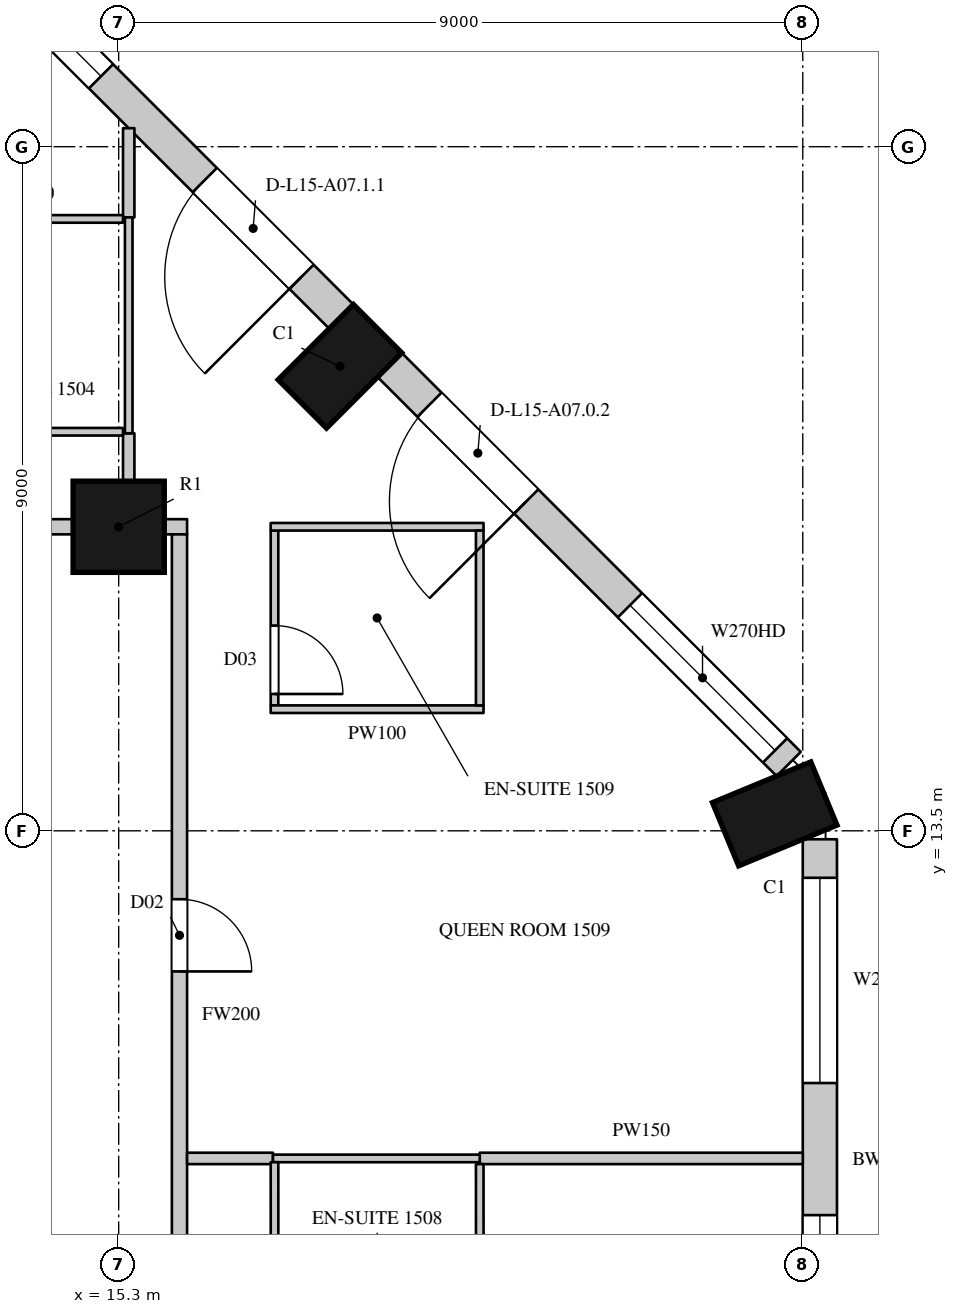
"""IFC4 building model, lengths in metres.
Left out: names, types, materials, properties, quantities, classifications, styles, units other than length and angle.
Written with IfcOpenShell. Run it as: python <this file> out.ifc"""

import sys

from ifc_helpers import new_model, si_unit, direction, frame, frame_2d, origin, origin_2d, place, context, subcontext, project, spatial, rectangle, circle, extrude, element, fill, save


model = new_model("IFC4")
c1 = context("Model", 3, precision=1e-05, world=origin(), true_north=direction((0.0, 1.0)))
c2 = subcontext(c1, "Body", "Model", "MODEL_VIEW")
j1 = project(units=[si_unit("LENGTHUNIT", "METRE"), si_unit("PLANEANGLEUNIT", "RADIAN")], contexts=[c1])
p1 = place(None, origin())
s1 = spatial("IfcSite", under=j1, at=p1, CompositionType="ELEMENT")
p2 = place(p1, origin())
s2 = spatial("IfcBuilding", under=s1, at=p2, CompositionType="ELEMENT")
p3 = place(p2, frame((0.0, 0.0, 84.3)))
s3 = spatial("IfcBuildingStorey", under=s2, at=p3, CompositionType="ELEMENT", Elevation=84.3)
for number, where, z_axis, x_axis in (
    (1, (23.931, 13.723, 0.0), (0.0, 0.0, 1.0), (-0.383, 0.924, 0.0)),
    (2, (18.211, 19.611, 0.0), (0.0, 0.0, 1.0), (-0.707, 0.707, 0.0)),
):
    element("IfcColumn", number, at=place(p3, frame(where, z_axis=z_axis, x_axis=x_axis)), inside=s3, PredefinedType="COLUMN", context=c2, shape_type="SweptSolid", body=[
        extrude(rectangle(XDim=0.9, YDim=1.4, at=origin_2d()), origin(), (0.0, 0.0, 1.0), 3.6),
    ])
p4 = place(p3, frame((15.3, 17.5, 0.0), z_axis=(0.0, 0.0, 1.0), x_axis=(1.0, 0.0, 0.0)))
e3 = element("IfcColumn", 3, at=p4, inside=s3, PredefinedType="COLUMN", context=c2, shape_type="SweptSolid", body=[
    extrude(circle(Radius=0.6, at=origin_2d()), origin(), (0.0, 0.0, 1.0), 3.6),
])
p5 = place(p3, frame((24.525, 4.95, 0.0), z_axis=(0.0, 0.0, 1.0), x_axis=(0.0, 1.0, 0.0)))
e4 = element("IfcWall", 4, at=p5, inside=s3, PredefinedType="SOLIDWALL", context=c2, shape_type="SweptSolid", body=[
    extrude(rectangle(XDim=8.439, YDim=0.45, at=frame_2d((4.219, 0.0))), origin(), (0.0, 0.0, 1.0), 3.3),
])
p6 = place(p5, frame((0.294, 0.0, 0.0)))
e5 = element("IfcOpeningElement", 5, at=p6, cuts=e4, PredefinedType="OPENING", context=c2, shape_type="SweptSolid", body=[
    extrude(rectangle(XDim=1.8, YDim=2.4, at=frame_2d((0.9, 1.2))), frame((0.0, 0.235, 0.0), z_axis=(0.0, -1.0, 0.0), x_axis=(1.0, 0.0, 0.0)), (0.0, 0.0, 1.0), 0.47),
])
p7 = place(p5, frame((2.294, 0.0, 1.05)))
e6 = element("IfcOpeningElement", 6, at=p7, cuts=e4, PredefinedType="OPENING", context=c2, shape_type="SweptSolid", body=[
    extrude(rectangle(XDim=1.2, YDim=2.0, at=frame_2d((0.6, 1.0))), frame((0.0, 0.235, 0.0), z_axis=(0.0, -1.0, 0.0), x_axis=(1.0, 0.0, 0.0)), (0.0, 0.0, 1.0), 0.47),
])
p8 = place(p5, frame((5.232, 0.0, 1.05)))
e7 = element("IfcOpeningElement", 7, at=p8, cuts=e4, PredefinedType="OPENING", context=c2, shape_type="SweptSolid", body=[
    extrude(rectangle(XDim=2.7, YDim=2.0, at=frame_2d((1.35, 1.0))), frame((0.0, 0.235, 0.0), z_axis=(0.0, -1.0, 0.0), x_axis=(1.0, 0.0, 0.0)), (0.0, 0.0, 1.0), 0.47),
])
p9 = place(p3, frame((24.115, 14.379, 0.0), z_axis=(0.0, 0.0, 1.0), x_axis=(-0.707106781187, 0.707106781187, 0.0)))
e8 = element("IfcWall", 8, at=p9, inside=s3, PredefinedType="SOLIDWALL", context=c2, shape_type="SweptSolid", body=[
    extrude(rectangle(XDim=7.424, YDim=0.45, at=frame_2d((3.712, 0.0))), origin(), (0.0, 0.0, 1.0), 3.3),
])
p10 = place(p9, frame((0.253, 0.0, 1.05)))
e9 = element("IfcOpeningElement", 9, at=p10, cuts=e8, PredefinedType="OPENING", context=c2, shape_type="SweptSolid", body=[
    extrude(rectangle(XDim=2.7, YDim=2.0, at=frame_2d((1.35, 1.0))), frame((0.0, 0.235, 0.0), z_axis=(0.0, -1.0, 0.0), x_axis=(1.0, 0.0, 0.0)), (0.0, 0.0, 1.0), 0.47),
])
p11 = place(p9, frame((4.884, 0.0, 0.0)))
e10 = element("IfcOpeningElement", 10, at=p11, cuts=e8, PredefinedType="OPENING", context=c2, shape_type="SweptSolid", body=[
    extrude(rectangle(XDim=1.8, YDim=2.4, at=frame_2d((0.9, 1.2))), frame((0.0, 0.235, 0.0), z_axis=(0.0, -1.0, 0.0), x_axis=(1.0, 0.0, 0.0)), (0.0, 0.0, 1.0), 0.47),
])
p12 = place(p3, frame((18.229, 20.265, 0.0), z_axis=(0.0, 0.0, 1.0), x_axis=(-0.707106781187, 0.707106781187, 0.0)))
e11 = element("IfcWall", 11, at=p12, inside=s3, PredefinedType="SOLIDWALL", context=c2, shape_type="SweptSolid", body=[
    extrude(rectangle(XDim=7.424, YDim=0.45, at=frame_2d((3.712, 0.0))), origin(), (0.0, 0.0, 1.0), 3.3),
])
p13 = place(p12, frame((0.74, 0.0, 0.0)))
e12 = element("IfcOpeningElement", 12, at=p13, cuts=e11, PredefinedType="OPENING", context=c2, shape_type="SweptSolid", body=[
    extrude(rectangle(XDim=1.8, YDim=2.4, at=frame_2d((0.9, 1.2))), frame((0.0, 0.235, 0.0), z_axis=(0.0, -1.0, 0.0), x_axis=(1.0, 0.0, 0.0)), (0.0, 0.0, 1.0), 0.47),
])
p14 = place(p12, frame((4.471, 0.0, 1.05)))
e13 = element("IfcOpeningElement", 13, at=p14, cuts=e11, PredefinedType="OPENING", context=c2, shape_type="SweptSolid", body=[
    extrude(rectangle(XDim=2.7, YDim=2.0, at=frame_2d((1.35, 1.0))), frame((0.0, 0.235, 0.0), z_axis=(0.0, -1.0, 0.0), x_axis=(1.0, 0.0, 0.0)), (0.0, 0.0, 1.0), 0.47),
])
p15 = place(p3, frame((23.15, 16.864, 0.0), z_axis=(0.0, 0.0, 1.0), x_axis=(-0.707106781187, 0.707106781187, 0.0)))
e14 = element("IfcWall", 14, at=p15, inside=s3, PredefinedType="SOLIDWALL", context=c2, shape_type="SweptSolid", body=[
    extrude(rectangle(XDim=1.445, YDim=0.45, at=frame_2d((0.722, 0.0))), origin(), (0.0, 0.0, 1.0), 0.6),
])
p16 = place(p3, frame((19.937, 20.078, 0.0), z_axis=(0.0, 0.0, 1.0), x_axis=(-0.707106781187, 0.707106781187, 0.0)))
e15 = element("IfcWall", 15, at=p16, inside=s3, PredefinedType="SOLIDWALL", context=c2, shape_type="SweptSolid", body=[
    extrude(rectangle(XDim=1.781, YDim=0.45, at=frame_2d((0.89, 0.0))), origin(), (0.0, 0.0, 1.0), 0.6),
])
p17 = place(p3, frame((16.486, 23.529, 0.0), z_axis=(0.0, 0.0, 1.0), x_axis=(-0.707022305137, 0.707191247145, 0.0)))
e16 = element("IfcWall", 16, at=p17, inside=s3, PredefinedType="SOLIDWALL", context=c2, shape_type="SweptSolid", body=[
    extrude(rectangle(XDim=1.445, YDim=0.45, at=frame_2d((0.723, 0.0))), origin(), (0.0, 0.0, 1.0), 0.6),
])
p18 = place(p3, frame((6.9, 17.5, 0.0), z_axis=(0.0, 0.0, 1.0), x_axis=(1.0, 0.0, 0.0)))
e17 = element("IfcWall", 17, at=p18, inside=s3, PredefinedType="PARTITIONING", context=c2, shape_type="SweptSolid", body=[
    extrude(rectangle(XDim=7.8, YDim=0.2, at=frame_2d((3.9, 0.0))), origin(), (0.0, 0.0, 1.0), 2.75),
])
p19 = place(p18, frame((1.45, 0.0, 0.0)))
e18 = element("IfcOpeningElement", 18, at=p19, cuts=e17, PredefinedType="OPENING", context=c2, shape_type="SweptSolid", body=[
    extrude(rectangle(XDim=1.1, YDim=2.4, at=frame_2d((0.55, 1.2))), frame((0.0, 0.11, 0.0), z_axis=(0.0, -1.0, 0.0), x_axis=(1.0, 0.0, 0.0)), (0.0, 0.0, 1.0), 0.22),
])
p20 = place(p3, frame((15.9, 17.5, 0.0), z_axis=(0.0, 0.0, 1.0), x_axis=(1.0, 0.0, 0.0)))
e19 = element("IfcWall", 19, at=p20, inside=s3, PredefinedType="PARTITIONING", context=c2, shape_type="SweptSolid", body=[
    extrude(rectangle(XDim=0.3, YDim=0.2, at=frame_2d((0.15, 0.0))), origin(), (0.0, 0.0, 1.0), 3.3),
])
p21 = place(p3, frame((16.1, 4.75, 0.0), z_axis=(0.0, 0.0, 1.0), x_axis=(0.0, 1.0, 0.0)))
e20 = element("IfcWall", 20, at=p21, inside=s3, PredefinedType="PARTITIONING", context=c2, shape_type="SweptSolid", body=[
    extrude(rectangle(XDim=12.65, YDim=0.2, at=frame_2d((6.325, 0.0))), origin(), (0.0, 0.0, 1.0), 3.3),
])
p22 = place(p21, frame((0.5, 0.0, 0.0)))
e21 = element("IfcOpeningElement", 21, at=p22, cuts=e20, PredefinedType="OPENING", context=c2, shape_type="SweptSolid", body=[
    extrude(rectangle(XDim=0.95, YDim=2.2, at=frame_2d((0.475, 1.1))), frame((0.0, 0.11, 0.0), z_axis=(0.0, -1.0, 0.0), x_axis=(1.0, 0.0, 0.0)), (0.0, 0.0, 1.0), 0.22),
])
p23 = place(p21, frame((6.9, 0.0, 0.0)))
e22 = element("IfcOpeningElement", 22, at=p23, cuts=e20, PredefinedType="OPENING", context=c2, shape_type="SweptSolid", body=[
    extrude(rectangle(XDim=0.95, YDim=2.2, at=frame_2d((0.475, 1.1))), frame((0.0, 0.11, 0.0), z_axis=(0.0, -1.0, 0.0), x_axis=(1.0, 0.0, 0.0)), (0.0, 0.0, 1.0), 0.22),
])
p24 = place(p3, frame((15.432, 18.094, 0.0), z_axis=(0.0, 0.0, 1.0), x_axis=(0.0, 1.0, 0.0)))
e23 = element("IfcWall", 23, at=p24, inside=s3, PredefinedType="PARTITIONING", context=c2, shape_type="SweptSolid", body=[
    extrude(rectangle(XDim=0.636, YDim=0.15, at=frame_2d((0.318, 0.0))), origin(), (0.0, 0.0, 1.0), 3.3),
])
p25 = place(p3, frame((15.432, 21.57, 0.0), z_axis=(0.0, 0.0, 1.0), x_axis=(0.0, 1.0, 0.0)))
e24 = element("IfcWall", 24, at=p25, inside=s3, PredefinedType="PARTITIONING", context=c2, shape_type="SweptSolid", body=[
    extrude(rectangle(XDim=1.174, YDim=0.15, at=frame_2d((0.587, 0.0))), origin(), (0.0, 0.0, 1.0), 3.3),
])
p26 = place(p3, frame((16.2, 9.19, 0.0), z_axis=(0.0, 0.0, 1.0), x_axis=(1.0, 0.0, 0.0)))
e25 = element("IfcWall", 25, at=p26, inside=s3, PredefinedType="PARTITIONING", context=c2, shape_type="SweptSolid", body=[
    extrude(rectangle(XDim=1.13, YDim=0.15, at=frame_2d((0.565, 0.0))), origin(), (0.0, 0.0, 1.0), 2.65),
])
p27 = place(p3, frame((20.05, 9.19, 0.0), z_axis=(0.0, 0.0, 1.0), x_axis=(1.0, 0.0, 0.0)))
e26 = element("IfcWall", 26, at=p27, inside=s3, PredefinedType="PARTITIONING", context=c2, shape_type="SweptSolid", body=[
    extrude(rectangle(XDim=4.25, YDim=0.15, at=frame_2d((2.125, 0.0))), origin(), (0.0, 0.0, 1.0), 2.65),
])
for number, where, z_axis, x_axis in (
    (27, (12.786, 18.75, 0.0), (0.0, 0.0, 1.0), (1.0, 0.0, 0.0)),
    (28, (12.786, 21.55, 0.0), (0.0, 0.0, 1.0), (1.0, 0.0, 0.0)),
):
    element("IfcWall", number, at=place(p3, frame(where, z_axis=z_axis, x_axis=x_axis)), inside=s3, PredefinedType="PARTITIONING", context=c2, shape_type="SweptSolid", body=[
        extrude(rectangle(XDim=2.571, YDim=0.1, at=frame_2d((1.286, 0.0))), origin(), (0.0, 0.0, 1.0), 3.3),
    ])
p28 = place(p3, frame((15.432, 18.73, 0.0), z_axis=(0.0, 0.0, 1.0), x_axis=(0.0, 1.0, 0.0)))
e29 = element("IfcWall", 29, at=p28, inside=s3, PredefinedType="PARTITIONING", context=c2, shape_type="SweptSolid", body=[
    extrude(rectangle(XDim=2.84, YDim=0.1, at=frame_2d((1.42, 0.0))), origin(), (0.0, 0.0, 1.0), 3.3),
])
p29 = place(p3, frame((17.33, 9.19, 0.0), z_axis=(0.0, 0.0, 1.0), x_axis=(1.0, 0.0, 0.0)))
e30 = element("IfcWall", 30, at=p29, inside=s3, PredefinedType="PARTITIONING", context=c2, shape_type="SweptSolid", body=[
    extrude(rectangle(XDim=2.72, YDim=0.1, at=frame_2d((1.36, 0.0))), origin(), (0.0, 0.0, 1.0), 2.65),
])
p30 = place(p3, frame((17.35, 9.14, 0.0), z_axis=(0.0, 0.0, 1.0), x_axis=(0.000407580973, -0.999999916939, 0.0)))
e31 = element("IfcWall", 31, at=p30, inside=s3, PredefinedType="PARTITIONING", context=c2, shape_type="SweptSolid", body=[
    extrude(rectangle(XDim=2.396, YDim=0.1, at=frame_2d((1.198, 0.0))), origin(), (0.0, 0.0, 1.0), 3.3),
])
p31 = place(p30, frame((1.25, 0.0, 0.0)))
e32 = element("IfcOpeningElement", 32, at=p31, cuts=e31, PredefinedType="OPENING", context=c2, shape_type="SweptSolid", body=[
    extrude(rectangle(XDim=0.9, YDim=2.2, at=frame_2d((0.45, 1.1))), frame((0.0, 0.06, 0.0), z_axis=(0.0, -1.0, 0.0), x_axis=(1.0, 0.0, 0.0)), (0.0, 0.0, 1.0), 0.12),
])
p32 = place(p3, frame((17.35, 15.15, 0.0), z_axis=(0.0, 0.0, 1.0), x_axis=(0.0, 1.0, 0.0)))
e33 = element("IfcWall", 33, at=p32, inside=s3, PredefinedType="PARTITIONING", context=c2, shape_type="SweptSolid", body=[
    extrude(rectangle(XDim=2.3, YDim=0.1, at=frame_2d((1.15, 0.0))), origin(), (0.0, 0.0, 1.0), 3.3),
])
p33 = place(p32, frame((0.15, 0.0, 0.0)))
e34 = element("IfcOpeningElement", 34, at=p33, cuts=e33, PredefinedType="OPENING", context=c2, shape_type="SweptSolid", body=[
    extrude(rectangle(XDim=0.9, YDim=2.2, at=frame_2d((0.45, 1.1))), frame((0.0, 0.06, 0.0), z_axis=(0.0, -1.0, 0.0), x_axis=(1.0, 0.0, 0.0)), (0.0, 0.0, 1.0), 0.12),
])
for number, where, z_axis, x_axis in (
    (35, (17.3, 15.1, 0.0), (0.0, 0.0, 1.0), (1.0, 0.0, 0.0)),
    (36, (17.3, 17.5, 0.0), (0.0, 0.0, 1.0), (1.0, 0.0, 0.0)),
):
    element("IfcWall", number, at=place(p3, frame(where, z_axis=z_axis, x_axis=x_axis)), inside=s3, PredefinedType="PARTITIONING", context=c2, shape_type="SweptSolid", body=[
        extrude(rectangle(XDim=2.8, YDim=0.1, at=frame_2d((1.4, 0.0))), origin(), (0.0, 0.0, 1.0), 3.3),
    ])
p34 = place(p3, frame((20.05, 9.115, 0.0), z_axis=(0.0, 0.0, 1.0), x_axis=(0.000430200003, -0.999999907464, 0.0)))
e37 = element("IfcWall", 37, at=p34, inside=s3, PredefinedType="PARTITIONING", context=c2, shape_type="SweptSolid", body=[
    extrude(rectangle(XDim=2.27, YDim=0.1, at=frame_2d((1.135, 0.0))), origin(), (0.0, 0.0, 1.0), 3.3),
])
p35 = place(p3, frame((20.05, 15.15, 0.0), z_axis=(0.0, 0.0, 1.0), x_axis=(0.0, 1.0, 0.0)))
e38 = element("IfcWall", 38, at=p35, inside=s3, PredefinedType="PARTITIONING", context=c2, shape_type="SweptSolid", body=[
    extrude(rectangle(XDim=2.3, YDim=0.1, at=frame_2d((1.15, 0.0))), origin(), (0.0, 0.0, 1.0), 3.3),
])
p36 = place(p7, origin())
e39 = element("IfcWindow", 39, at=p36, inside=s3, PartitioningType="SINGLE_PANEL", PredefinedType="WINDOW", context=c2, shape_type="SweptSolid", body=[
    extrude(rectangle(XDim=1.2, YDim=2.0, at=frame_2d((0.6, 1.0))), frame((0.0, 0.135, 0.0), z_axis=(0.0, -1.0, 0.0), x_axis=(1.0, 0.0, 0.0)), (0.0, 0.0, 1.0), 0.06),
])
fill(e6, e39)
p37 = place(p8, origin())
e40 = element("IfcWindow", 40, at=p37, inside=s3, PartitioningType="SINGLE_PANEL", PredefinedType="WINDOW", context=c2, shape_type="SweptSolid", body=[
    extrude(rectangle(XDim=2.7, YDim=2.0, at=frame_2d((1.35, 1.0))), frame((0.0, 0.135, 0.0), z_axis=(0.0, -1.0, 0.0), x_axis=(1.0, 0.0, 0.0)), (0.0, 0.0, 1.0), 0.06),
])
fill(e7, e40)
p38 = place(p10, origin())
e41 = element("IfcWindow", 41, at=p38, inside=s3, PartitioningType="SINGLE_PANEL", PredefinedType="WINDOW", context=c2, shape_type="SweptSolid", body=[
    extrude(rectangle(XDim=2.7, YDim=2.0, at=frame_2d((1.35, 1.0))), frame((0.0, 0.135, 0.0), z_axis=(0.0, -1.0, 0.0), x_axis=(1.0, 0.0, 0.0)), (0.0, 0.0, 1.0), 0.06),
])
fill(e9, e41)
p39 = place(p11, origin())
e42 = element("IfcDoor", 42, at=p39, inside=s3, OperationType="SLIDING_TO_LEFT", PredefinedType="DOOR", context=c2, shape_type="SweptSolid", body=[
    extrude(rectangle(XDim=1.8, YDim=2.4, at=frame_2d((0.9, 1.2))), frame((0.0, 0.13, 0.0), z_axis=(0.0, -1.0, 0.0), x_axis=(1.0, 0.0, 0.0)), (0.0, 0.0, 1.0), 0.05),
])
fill(e10, e42)
p40 = place(p13, origin())
e43 = element("IfcDoor", 43, at=p40, inside=s3, OperationType="SLIDING_TO_LEFT", PredefinedType="DOOR", context=c2, shape_type="SweptSolid", body=[
    extrude(rectangle(XDim=1.8, YDim=2.4, at=frame_2d((0.9, 1.2))), frame((0.0, 0.13, 0.0), z_axis=(0.0, -1.0, 0.0), x_axis=(1.0, 0.0, 0.0)), (0.0, 0.0, 1.0), 0.05),
])
fill(e12, e43)
p41 = place(p14, origin())
e44 = element("IfcWindow", 44, at=p41, inside=s3, PartitioningType="SINGLE_PANEL", PredefinedType="WINDOW", context=c2, shape_type="SweptSolid", body=[
    extrude(rectangle(XDim=2.7, YDim=2.0, at=frame_2d((1.35, 1.0))), frame((0.0, 0.135, 0.0), z_axis=(0.0, -1.0, 0.0), x_axis=(1.0, 0.0, 0.0)), (0.0, 0.0, 1.0), 0.06),
])
fill(e13, e44)
p42 = place(p23, origin())
e45 = element("IfcDoor", 45, at=p42, inside=s3, OperationType="SINGLE_SWING_RIGHT", PredefinedType="DOOR", context=c2, shape_type="SweptSolid", body=[
    extrude(rectangle(XDim=0.95, YDim=2.2, at=frame_2d((0.475, 1.1))), frame((0.0, 0.025, 0.0), z_axis=(0.0, -1.0, 0.0), x_axis=(1.0, 0.0, 0.0)), (0.0, 0.0, 1.0), 0.05),
])
fill(e22, e45)
p43 = place(p33, origin())
e46 = element("IfcDoor", 46, at=p43, inside=s3, OperationType="SINGLE_SWING_RIGHT", PredefinedType="DOOR", context=c2, shape_type="SweptSolid", body=[
    extrude(rectangle(XDim=0.9, YDim=2.2, at=frame_2d((0.45, 1.1))), frame((0.0, 0.025, 0.0), z_axis=(0.0, -1.0, 0.0), x_axis=(1.0, 0.0, 0.0)), (0.0, 0.0, 1.0), 0.05),
])
fill(e34, e46)
save(model, sys.argv[1])
